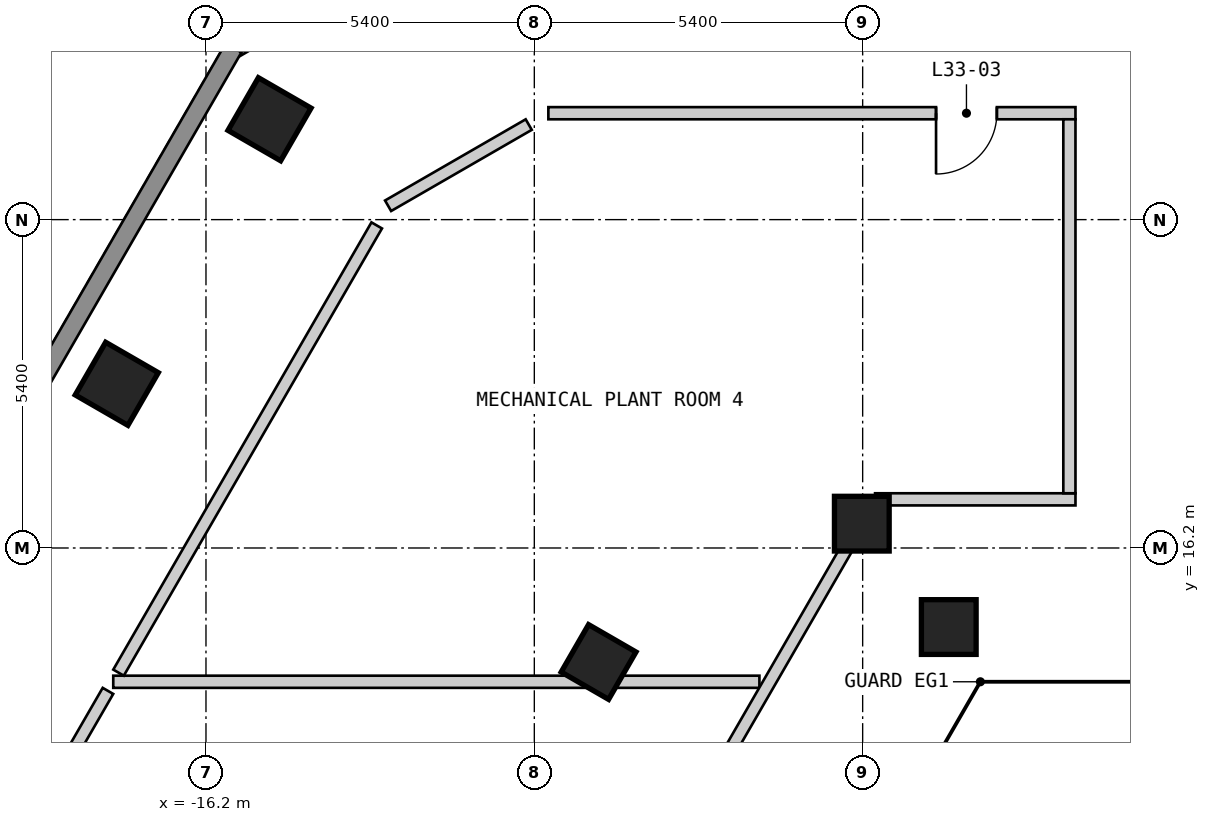
"""IFC4 building model, lengths in metres.
Left out: names, types, materials, properties, quantities, classifications, styles, units other than length and angle.
Written with IfcOpenShell. Run it as: python <this file> out.ifc"""

import sys

from ifc_helpers import new_model, si_unit, direction, frame, frame_2d, origin, origin_2d, place, context, subcontext, project, spatial, polyline, rectangle, outline, extrude, element, fill, save


model = new_model("IFC4")
c1 = context("Model", 3, precision=1e-05, world=origin(), true_north=direction((0.0, 1.0)))
c2 = subcontext(c1, "Body", "Model", "MODEL_VIEW")
j1 = project(units=[si_unit("LENGTHUNIT", "METRE"), si_unit("PLANEANGLEUNIT", "RADIAN")], contexts=[c1])
p1 = place(None, origin())
s1 = spatial("IfcSite", under=j1, at=p1, CompositionType="ELEMENT")
p2 = place(p1, origin())
s2 = spatial("IfcBuilding", under=s1, at=p2, CompositionType="ELEMENT")
p3 = place(p2, frame((0.0, 0.0, 108.0)))
s3 = spatial("IfcBuildingStorey", under=s2, at=p3, CompositionType="ELEMENT", Elevation=108.0)
for number, where, z_axis, x_axis in (
    (1, (-15.155, 23.251, 0.0), (0.0, 0.0, 1.0), (-0.5, -0.866, 0.0)),
    (2, (-17.667, 18.9, 0.0), (0.0, 0.0, 1.0), (-0.5, -0.866, 0.0)),
):
    element("IfcColumn", number, at=place(p3, frame(where, z_axis=z_axis, x_axis=x_axis)), inside=s3, PredefinedType="COLUMN", context=c2, shape_type="SweptSolid", body=[
        extrude(rectangle(XDim=1.0, YDim=1.0, at=origin_2d()), origin(), (0.0, 0.0, 1.0), 3.6),
    ])
for number, where, z_axis, x_axis in (
    (3, (-3.984, 14.9, 0.0), (0.0, 0.0, 1.0), (1.0, 0.0, 0.0)),
    (4, (-5.414, 16.6, 0.0), (0.0, 0.0, 1.0), (-1.0, 0.0, 0.0)),
    (5, (-9.743, 14.325, 0.0), (0.0, 0.0, 1.0), (-0.5, -0.866, 0.0)),
):
    element("IfcColumn", number, at=place(p3, frame(where, z_axis=z_axis, x_axis=x_axis)), inside=s3, PredefinedType="COLUMN", context=c2, shape_type="SweptSolid", body=[
        extrude(rectangle(XDim=0.9, YDim=0.9, at=origin_2d()), origin(), (0.0, 0.0, 1.0), 3.6),
    ])
p4 = place(p3, frame((-11.472, 26.87, 0.0), z_axis=(0.0, 0.0, 1.0), x_axis=(-0.866022959057, -0.500004234368, 0.0)))
e6 = element("IfcWall", 6, at=p4, inside=s3, PredefinedType="SOLIDWALL", context=c2, shape_type="SweptSolid", body=[
    extrude(outline(polyline([(0.0, -0.15), (5.0, -0.15), (4.92, 0.15), (0.08, 0.15), (0.0, -0.15)])), origin(), (0.0, 0.0, 1.0), 2.6),
])
p5 = place(p3, frame((-15.747, 24.425, 0.0), z_axis=(0.0, 0.0, 1.0), x_axis=(-0.500027479704, -0.866009537788, 0.0)))
e7 = element("IfcWall", 7, at=p5, inside=s3, PredefinedType="SOLIDWALL", context=c2, shape_type="SweptSolid", body=[
    extrude(outline(polyline([(0.0, -0.15), (26.559, -0.15), (26.478, 0.15), (0.08, 0.15), (0.0, -0.15)])), origin(), (0.0, 0.0, 1.0), 2.6),
])
p6 = place(p3, frame((-17.725, 14.0, 0.0), z_axis=(0.0, 0.0, 1.0), x_axis=(1.0, 0.0, 0.0)))
e8 = element("IfcWall", 8, at=p6, inside=s3, PredefinedType="SOLIDWALL", context=c2, shape_type="SweptSolid", body=[
    extrude(rectangle(XDim=10.627, YDim=0.2, at=frame_2d((5.313, 0.0))), origin(), (0.0, 0.0, 1.0), 2.6),
])
p7 = place(p3, frame((-5.196, 17.0, 0.0), z_axis=(0.0, 0.0, 1.0), x_axis=(1.0, 0.0, 0.0)))
e9 = element("IfcWall", 9, at=p7, inside=s3, PredefinedType="SOLIDWALL", context=c2, shape_type="SweptSolid", body=[
    extrude(rectangle(XDim=3.296, YDim=0.2, at=frame_2d((1.648, 0.0))), origin(), (0.0, 0.0, 1.0), 2.6),
])
p8 = place(p3, frame((-10.569, 23.35, 0.0), z_axis=(0.0, 0.0, 1.0), x_axis=(1.0, 0.0, 0.0)))
e10 = element("IfcWall", 10, at=p8, inside=s3, PredefinedType="SOLIDWALL", context=c2, shape_type="SweptSolid", body=[
    extrude(rectangle(XDim=8.669, YDim=0.2, at=frame_2d((4.334, 0.0))), origin(), (0.0, 0.0, 1.0), 2.6),
])
p9 = place(p8, frame((7.376, 0.0, 0.0), z_axis=(0.0, 0.0, 1.0), x_axis=(-1.0, 0.0, 0.0)))
e11 = element("IfcOpeningElement", 11, at=p9, cuts=e10, PredefinedType="OPENING", context=c2, shape_type="SweptSolid", body=[
    extrude(rectangle(XDim=1.0, YDim=2.1, at=frame_2d((0.5, 1.05))), frame((0.0, 0.11, 0.0), z_axis=(0.0, -1.0, 0.0), x_axis=(1.0, 0.0, 0.0)), (0.0, 0.0, 1.0), 0.22),
])
p10 = place(p3, frame((-2.0, 17.1, 0.0), z_axis=(0.0, 0.0, 1.0), x_axis=(0.0, 1.0, 0.0)))
e12 = element("IfcWall", 12, at=p10, inside=s3, PredefinedType="SOLIDWALL", context=c2, shape_type="SweptSolid", body=[
    extrude(rectangle(XDim=6.15, YDim=0.2, at=frame_2d((3.075, 0.0))), origin(), (0.0, 0.0, 1.0), 2.6),
])
p11 = place(p3, frame((-13.205, 21.828, 0.0), z_axis=(0.0, 0.0, 1.0), x_axis=(0.866057719929, 0.499944022619, 0.0)))
e13 = element("IfcWall", 13, at=p11, inside=s3, PredefinedType="SOLIDWALL", context=c2, shape_type="SweptSolid", body=[
    extrude(rectangle(XDim=2.671, YDim=0.2, at=frame_2d((1.335, 0.0))), origin(), (0.0, 0.0, 1.0), 2.6),
])
p12 = place(p3, frame((-10.305, 8.15, 0.0), z_axis=(0.0, 0.0, 1.0), x_axis=(0.499918809126, 0.866072274283, 0.0)))
e14 = element("IfcWall", 14, at=p12, inside=s3, PredefinedType="SOLIDWALL", context=c2, shape_type="SweptSolid", body=[
    extrude(rectangle(XDim=10.046, YDim=0.2, at=frame_2d((5.023, 0.0))), origin(), (0.0, 0.0, 1.0), 2.6),
])
p13 = place(p3, frame((-24.567, 2.15, 0.0), z_axis=(0.0, 0.0, 1.0), x_axis=(0.499987337164, 0.866032714553, 0.0)))
e15 = element("IfcWall", 15, at=p13, inside=s3, PredefinedType="SOLIDWALL", context=c2, shape_type="SweptSolid", body=[
    extrude(rectangle(XDim=13.51, YDim=0.2, at=frame_2d((6.755, 0.0))), origin(), (0.0, 0.0, 1.0), 2.6),
])
p14 = place(p3, frame((-17.638, 14.15, 0.0), z_axis=(0.0, 0.0, 1.0), x_axis=(0.499951396692, 0.866053463099, 0.0)))
e16 = element("IfcWall", 16, at=p14, inside=s3, PredefinedType="SOLIDWALL", context=c2, shape_type="SweptSolid", body=[
    extrude(rectangle(XDim=8.492, YDim=0.2, at=frame_2d((4.246, 0.0))), origin(), (0.0, 0.0, 1.0), 2.6),
])
p15 = place(p9, origin())
e17 = element("IfcDoor", 17, at=p15, inside=s3, OperationType="SINGLE_SWING_RIGHT", PredefinedType="DOOR", context=c2, shape_type="SweptSolid", body=[
    extrude(rectangle(XDim=1.0, YDim=2.1, at=frame_2d((0.5, 1.05))), frame((0.0, 0.025, 0.0), z_axis=(0.0, -1.0, 0.0), x_axis=(1.0, 0.0, 0.0)), (0.0, 0.0, 1.0), 0.05),
])
fill(e11, e17)
save(model, sys.argv[1])
